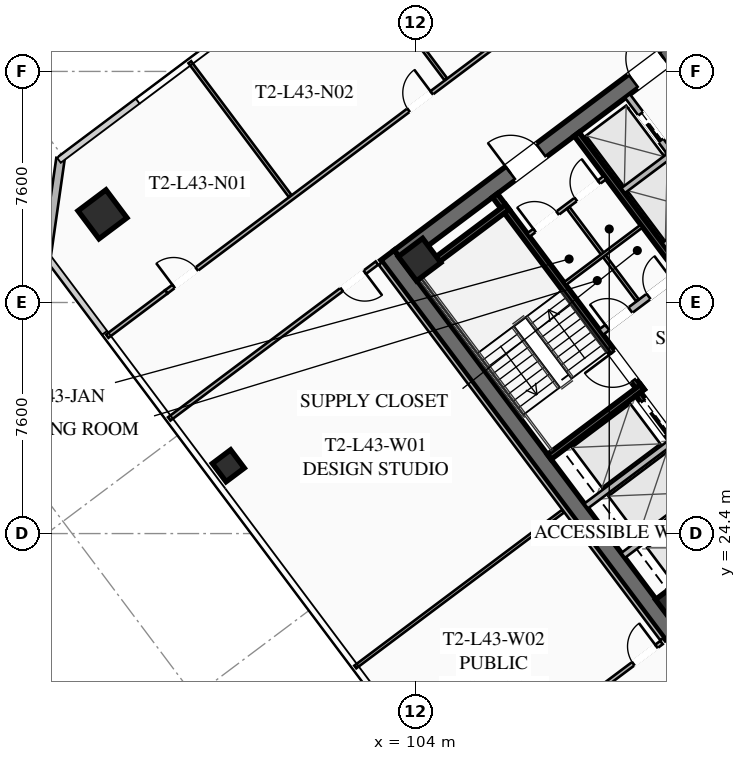
"""IFC4 building model, lengths in metres.
Left out: names, types, materials, properties, quantities, classifications, styles, units other than length and angle.
Written with IfcOpenShell. Run it as: python <this file> out.ifc"""

import sys

from ifc_helpers import new_model, si_unit, direction, frame, frame_2d, origin, origin_2d, place, context, subcontext, project, spatial, rectangle, hollow_rectangle, extrude, element, fill, save


model = new_model("IFC4")
c1 = context("Model", 3, precision=1e-05, world=origin(), true_north=direction((0.0, 1.0)))
c2 = subcontext(c1, "Body", "Model", "MODEL_VIEW")
j1 = project(units=[si_unit("LENGTHUNIT", "METRE"), si_unit("PLANEANGLEUNIT", "RADIAN")], contexts=[c1])
p1 = place(None, origin())
s1 = spatial("IfcSite", under=j1, at=p1, CompositionType="ELEMENT")
p2 = place(p1, origin())
s2 = spatial("IfcBuilding", under=s1, at=p2, CompositionType="ELEMENT")
p3 = place(p2, frame((0.0, 0.0, 160.55)))
s3 = spatial("IfcBuildingStorey", under=s2, at=p3, CompositionType="ELEMENT", Elevation=160.55)
p4 = place(p3, frame((112.436, 21.077, 0.0), z_axis=(0.0, 0.0, 1.0), x_axis=(-0.600005007985, 0.799996243986, 0.0)))
e1 = element("IfcWall", 1, at=p4, inside=s3, PredefinedType="SHEAR", context=c2, shape_type="SweptSolid", body=[
    extrude(rectangle(XDim=15.6, YDim=0.55, at=frame_2d((7.8, 0.0))), origin(), (0.0, 0.0, 1.0), 3.55),
])
p5 = place(p3, frame((103.461, 33.502, 0.0), z_axis=(0.0, 0.0, 1.0), x_axis=(0.799998054672, 0.600002593761, 0.0)))
e2 = element("IfcWall", 2, at=p5, inside=s3, PredefinedType="SHEAR", context=c2, shape_type="SweptSolid", body=[
    extrude(rectangle(XDim=15.06, YDim=0.55, at=frame_2d((7.53, 0.0))), origin(), (0.0, 0.0, 1.0), 3.55),
])
p6 = place(p5, frame((4.58, 0.0, 0.0)))
e3 = element("IfcOpeningElement", 3, at=p6, cuts=e2, PredefinedType="OPENING", context=c2, shape_type="SweptSolid", body=[
    extrude(rectangle(XDim=1.25, YDim=2.25, at=frame_2d((0.625, 1.125))), frame((0.0, 0.285, 0.0), z_axis=(0.0, -1.0, 0.0), x_axis=(1.0, 0.0, 0.0)), (0.0, 0.0, 1.0), 0.57),
])
p7 = place(p5, frame((9.63, 0.0, 0.0)))
e4 = element("IfcOpeningElement", 4, at=p7, cuts=e2, PredefinedType="OPENING", context=c2, shape_type="SweptSolid", body=[
    extrude(rectangle(XDim=1.25, YDim=2.25, at=frame_2d((0.625, 1.125))), frame((0.0, 0.285, 0.0), z_axis=(0.0, -1.0, 0.0), x_axis=(1.0, 0.0, 0.0)), (0.0, 0.0, 1.0), 0.57),
])
for number, where, z_axis, x_axis in (
    (5, (112.59, 22.13, 0.0), (0.0, 0.0, 1.0), (0.8, 0.6, 0.0)),
    (6, (104.13, 33.41, 0.0), (0.0, 0.0, 1.0), (0.8, 0.6, 0.0)),
):
    element("IfcColumn", number, at=place(p3, frame(where, z_axis=z_axis, x_axis=x_axis)), inside=s3, PredefinedType="COLUMN", context=c2, shape_type="SweptSolid", body=[
        extrude(hollow_rectangle(XDim=1.0, YDim=1.0, WallThickness=0.04, at=origin_2d()), origin(), (0.0, 0.0, 1.0), 3.37),
    ])
p8 = place(p3, frame((93.7, 34.9, 0.0), z_axis=(0.0, 0.0, 1.0), x_axis=(0.799999996291, 0.600000004945, 0.0)))
e7 = element("IfcColumn", 7, at=p8, inside=s3, PredefinedType="COLUMN", context=c2, shape_type="SweptSolid", body=[
    extrude(hollow_rectangle(XDim=1.15, YDim=1.15, WallThickness=0.045, at=origin_2d()), origin(), (0.0, 0.0, 1.0), 3.37),
])
p9 = place(p3, frame((97.84, 26.63, 0.0), z_axis=(0.0, 0.0, 1.0), x_axis=(0.799999996291, 0.600000004945, 0.0)))
e8 = element("IfcColumn", 8, at=p9, inside=s3, PredefinedType="COLUMN", context=c2, shape_type="SweptSolid", body=[
    extrude(hollow_rectangle(XDim=0.75, YDim=0.75, WallThickness=0.032, at=origin_2d()), origin(), (0.0, 0.0, 1.0), 3.37),
])
p10 = place(p3, frame((91.86, 33.52, 0.0), z_axis=(0.0, 0.0, 1.0), x_axis=(0.141410847992, 0.989950994782, 0.0)))
e9 = element("IfcWall", 9, at=p10, inside=s3, PredefinedType="SOLIDWALL", context=c2, shape_type="SweptSolid", body=[
    extrude(rectangle(XDim=3.253, YDim=0.28, at=frame_2d((1.626, 0.0))), origin(), (0.0, 0.0, 1.0), 3.37),
])
p11 = place(p3, frame((111.44, 29.08, 0.0), z_axis=(0.0, 0.0, 1.0), x_axis=(-0.59999029481, 0.8000072788, 0.0)))
e10 = element("IfcWall", 10, at=p11, inside=s3, PredefinedType="SHEAR", context=c2, shape_type="SweptSolid", body=[
    extrude(rectangle(XDim=8.05, YDim=0.2, at=frame_2d((4.025, 0.0))), origin(), (0.0, 0.0, 1.0), 3.37),
])
p12 = place(p11, frame((0.45, 0.0, 0.0)))
e11 = element("IfcOpeningElement", 11, at=p12, cuts=e10, PredefinedType="OPENING", context=c2, shape_type="SweptSolid", body=[
    extrude(rectangle(XDim=1.15, YDim=2.2, at=frame_2d((0.575, 1.1))), frame((0.0, 0.11, 0.0), z_axis=(0.0, -1.0, 0.0), x_axis=(1.0, 0.0, 0.0)), (0.0, 0.0, 1.0), 0.22),
])
for number, where, z_axis, x_axis in (
    (12, (108.396, 26.922, 0.0), (0.0, 0.0, 1.0), (0.8, 0.6, 0.0)),
    (13, (103.956, 32.842, 0.0), (0.0, 0.0, 1.0), (0.8, 0.6, 0.0)),
):
    element("IfcWall", number, at=place(p3, frame(where, z_axis=z_axis, x_axis=x_axis)), inside=s3, PredefinedType="SHEAR", context=c2, shape_type="SweptSolid", body=[
        extrude(rectangle(XDim=3.83, YDim=0.2, at=frame_2d((1.915, 0.0))), origin(), (0.0, 0.0, 1.0), 3.37),
    ])
p13 = place(p3, frame((117.998, 25.936, 0.0), z_axis=(0.0, 0.0, 1.0), x_axis=(-0.600002693989, 0.799997979501, 0.0)))
e14 = element("IfcWall", 14, at=p13, inside=s3, PredefinedType="SHEAR", context=c2, shape_type="SweptSolid", body=[
    extrude(rectangle(XDim=14.5, YDim=0.2, at=frame_2d((7.25, 0.0))), origin(), (0.0, 0.0, 1.0), 3.37),
])
p14 = place(p3, frame((110.104, 31.028, 0.0), z_axis=(0.0, 0.0, 1.0), x_axis=(0.800018601094, 0.59997519774, 0.0)))
e15 = element("IfcWall", 15, at=p14, inside=s3, PredefinedType="SOLIDWALL", context=c2, shape_type="SweptSolid", body=[
    extrude(rectangle(XDim=3.15, YDim=0.22, at=frame_2d((1.575, 0.0))), origin(), (0.0, 0.0, 1.0), 2.723),
])
p15 = place(p14, frame((0.25, 0.0, 0.0)))
e16 = element("IfcOpeningElement", 16, at=p15, cuts=e15, PredefinedType="OPENING", context=c2, shape_type="SweptSolid", body=[
    extrude(rectangle(XDim=0.95, YDim=2.05, at=frame_2d((0.475, 1.025))), frame((0.0, 0.12, 0.0), z_axis=(0.0, -1.0, 0.0), x_axis=(1.0, 0.0, 0.0)), (0.0, 0.0, 1.0), 0.24),
])
p16 = place(p14, frame((1.95, 0.0, 0.0)))
e17 = element("IfcOpeningElement", 17, at=p16, cuts=e15, PredefinedType="OPENING", context=c2, shape_type="SweptSolid", body=[
    extrude(rectangle(XDim=0.95, YDim=2.05, at=frame_2d((0.475, 1.025))), frame((0.0, 0.12, 0.0), z_axis=(0.0, -1.0, 0.0), x_axis=(1.0, 0.0, 0.0)), (0.0, 0.0, 1.0), 0.24),
])
p17 = place(p3, frame((115.19, 23.83, 0.0), z_axis=(0.0, 0.0, 1.0), x_axis=(-0.599993943644, 0.800004542231, 0.0)))
e18 = element("IfcWall", 18, at=p17, inside=s3, PredefinedType="SHEAR", context=c2, shape_type="SweptSolid", body=[
    extrude(rectangle(XDim=6.45, YDim=0.2, at=frame_2d((3.225, 0.0))), origin(), (0.0, 0.0, 1.0), 3.37),
])
p18 = place(p17, frame((4.875, 0.0, 0.0)))
e19 = element("IfcOpeningElement", 19, at=p18, cuts=e18, PredefinedType="OPENING", context=c2, shape_type="SweptSolid", body=[
    extrude(rectangle(XDim=1.3, YDim=2.25, at=frame_2d((0.65, 1.125))), frame((0.0, 0.11, 0.0), z_axis=(0.0, -1.0, 0.0), x_axis=(1.0, 0.0, 0.0)), (0.0, 0.0, 1.0), 0.22),
])
p19 = place(p17, frame((2.875, 0.0, 0.0)))
e20 = element("IfcOpeningElement", 20, at=p19, cuts=e18, PredefinedType="OPENING", context=c2, shape_type="SweptSolid", body=[
    extrude(rectangle(XDim=1.3, YDim=2.25, at=frame_2d((0.65, 1.125))), frame((0.0, 0.11, 0.0), z_axis=(0.0, -1.0, 0.0), x_axis=(1.0, 0.0, 0.0)), (0.0, 0.0, 1.0), 0.22),
])
p20 = place(p17, frame((0.675, 0.0, 0.0)))
e21 = element("IfcOpeningElement", 21, at=p20, cuts=e18, PredefinedType="OPENING", context=c2, shape_type="SweptSolid", body=[
    extrude(rectangle(XDim=1.3, YDim=2.25, at=frame_2d((0.65, 1.125))), frame((0.0, 0.11, 0.0), z_axis=(0.0, -1.0, 0.0), x_axis=(1.0, 0.0, 0.0)), (0.0, 0.0, 1.0), 0.22),
])
for number, where, z_axis, x_axis in (
    (22, (110.826, 23.682, 0.0), (0.0, 0.0, 1.0), (0.8, 0.6, 0.0)),
    (23, (109.608, 25.306, 0.0), (0.0, 0.0, 1.0), (0.8, 0.6, 0.0)),
):
    element("IfcWall", number, at=place(p3, frame(where, z_axis=z_axis, x_axis=x_axis)), inside=s3, PredefinedType="SOLIDWALL", context=c2, shape_type="SweptSolid", body=[
        extrude(rectangle(XDim=3.48, YDim=0.2, at=frame_2d((1.74, 0.0))), origin(), (0.0, 0.0, 1.0), 3.37),
    ])
p21 = place(p3, frame((107.71, 34.22, 0.0), z_axis=(0.0, 0.0, 1.0), x_axis=(0.799981399002, 0.60002480053, 0.0)))
e24 = element("IfcWall", 24, at=p21, inside=s3, PredefinedType="PARTITIONING", context=c2, shape_type="SweptSolid", body=[
    extrude(rectangle(XDim=3.15, YDim=0.135, at=frame_2d((1.575, 0.0))), origin(), (0.0, 0.0, 1.0), 2.723),
])
p22 = place(p21, frame((0.25, 0.0, 0.0)))
e25 = element("IfcOpeningElement", 25, at=p22, cuts=e24, PredefinedType="OPENING", context=c2, shape_type="SweptSolid", body=[
    extrude(rectangle(XDim=0.95, YDim=2.05, at=frame_2d((0.475, 1.025))), frame((0.0, 0.077, 0.0), z_axis=(0.0, -1.0, 0.0), x_axis=(1.0, 0.0, 0.0)), (0.0, 0.0, 1.0), 0.155),
])
p23 = place(p21, frame((1.95, 0.0, 0.0)))
e26 = element("IfcOpeningElement", 26, at=p23, cuts=e24, PredefinedType="OPENING", context=c2, shape_type="SweptSolid", body=[
    extrude(rectangle(XDim=0.95, YDim=2.05, at=frame_2d((0.475, 1.025))), frame((0.0, 0.077, 0.0), z_axis=(0.0, -1.0, 0.0), x_axis=(1.0, 0.0, 0.0)), (0.0, 0.0, 1.0), 0.155),
])
p24 = place(p3, frame((111.296, 32.072, 0.0), z_axis=(0.0, 0.0, 1.0), x_axis=(-0.59995887973, 0.800030838552, 0.0)))
e27 = element("IfcWall", 27, at=p24, inside=s3, PredefinedType="PARTITIONING", context=c2, shape_type="SweptSolid", body=[
    extrude(rectangle(XDim=3.8, YDim=0.11, at=frame_2d((1.9, 0.0))), origin(), (0.0, 0.0, 1.0), 2.723),
])
p25 = place(p3, frame((108.91, 32.62, 0.0), z_axis=(0.0, 0.0, 1.0), x_axis=(0.800018601094, 0.59997519774, 0.0)))
e28 = element("IfcWall", 28, at=p25, inside=s3, PredefinedType="PARTITIONING", context=c2, shape_type="SweptSolid", body=[
    extrude(rectangle(XDim=3.15, YDim=0.11, at=frame_2d((1.575, 0.0))), origin(), (0.0, 0.0, 1.0), 2.723),
])
p26 = place(p3, frame((115.11, 33.27, 0.0), z_axis=(0.0, 0.0, 1.0), x_axis=(-0.600011322243, 0.799991508192, 0.0)))
e29 = element("IfcWall", 29, at=p26, inside=s3, PredefinedType="SOLIDWALL", context=c2, shape_type="SweptSolid", body=[
    extrude(rectangle(XDim=6.9, YDim=0.2, at=frame_2d((3.45, 0.0))), origin(), (0.0, 0.0, 1.0), 3.37),
])
p27 = place(p26, frame((0.575, 0.0, 0.0)))
e30 = element("IfcOpeningElement", 30, at=p27, cuts=e29, PredefinedType="OPENING", context=c2, shape_type="SweptSolid", body=[
    extrude(rectangle(XDim=1.1, YDim=2.2, at=frame_2d((0.55, 1.1))), frame((0.0, 0.11, 0.0), z_axis=(0.0, -1.0, 0.0), x_axis=(1.0, 0.0, 0.0)), (0.0, 0.0, 1.0), 0.22),
])
p28 = place(p26, frame((2.825, 0.0, 0.0)))
e31 = element("IfcOpeningElement", 31, at=p28, cuts=e29, PredefinedType="OPENING", context=c2, shape_type="SweptSolid", body=[
    extrude(rectangle(XDim=1.1, YDim=2.2, at=frame_2d((0.55, 1.1))), frame((0.0, 0.11, 0.0), z_axis=(0.0, -1.0, 0.0), x_axis=(1.0, 0.0, 0.0)), (0.0, 0.0, 1.0), 0.22),
])
p29 = place(p26, frame((5.075, 0.0, 0.0)))
e32 = element("IfcOpeningElement", 32, at=p29, cuts=e29, PredefinedType="OPENING", context=c2, shape_type="SweptSolid", body=[
    extrude(rectangle(XDim=1.1, YDim=2.2, at=frame_2d((0.55, 1.1))), frame((0.0, 0.11, 0.0), z_axis=(0.0, -1.0, 0.0), x_axis=(1.0, 0.0, 0.0)), (0.0, 0.0, 1.0), 0.22),
])
p30 = place(p3, frame((112.176, 33.882, 0.0), z_axis=(0.0, 0.0, 1.0), x_axis=(0.8, 0.6, 0.0)))
e33 = element("IfcWall", 33, at=p30, inside=s3, PredefinedType="SOLIDWALL", context=c2, shape_type="SweptSolid", body=[
    extrude(rectangle(XDim=1.88, YDim=0.2, at=frame_2d((0.94, 0.0))), origin(), (0.0, 0.0, 1.0), 3.37),
])
p31 = place(p3, frame((110.826, 35.682, 0.0), z_axis=(0.0, 0.0, 1.0), x_axis=(0.799984418148, 0.600020775241, 0.0)))
e34 = element("IfcWall", 34, at=p31, inside=s3, PredefinedType="SOLIDWALL", context=c2, shape_type="SweptSolid", body=[
    extrude(rectangle(XDim=1.88, YDim=0.2, at=frame_2d((0.94, 0.0))), origin(), (0.0, 0.0, 1.0), 3.37),
])
p32 = place(p3, frame((95.8, 32.35, 0.0), z_axis=(0.0, 0.0, 1.0), x_axis=(0.8, 0.6, 0.0)))
e35 = element("IfcWall", 35, at=p32, inside=s3, PredefinedType="PARTITIONING", context=c2, shape_type="SweptSolid", body=[
    extrude(rectangle(XDim=28.7, YDim=0.135, at=frame_2d((14.35, 0.0))), origin(), (0.0, 0.0, 1.0), 2.723),
])
p33 = place(p32, frame((0.3, 0.0, 0.0)))
e36 = element("IfcOpeningElement", 36, at=p33, cuts=e35, PredefinedType="OPENING", context=c2, shape_type="SweptSolid", body=[
    extrude(rectangle(XDim=0.95, YDim=2.05, at=frame_2d((0.475, 1.025))), frame((0.0, 0.077, 0.0), z_axis=(0.0, -1.0, 0.0), x_axis=(1.0, 0.0, 0.0)), (0.0, 0.0, 1.0), 0.155),
])
p34 = place(p32, frame((9.959, 0.0, 0.0)))
e37 = element("IfcOpeningElement", 37, at=p34, cuts=e35, PredefinedType="OPENING", context=c2, shape_type="SweptSolid", body=[
    extrude(rectangle(XDim=0.95, YDim=2.05, at=frame_2d((0.475, 1.025))), frame((0.0, 0.077, 0.0), z_axis=(0.0, -1.0, 0.0), x_axis=(1.0, 0.0, 0.0)), (0.0, 0.0, 1.0), 0.155),
])
p35 = place(p32, frame((14.005, 0.0, 0.0)))
e38 = element("IfcOpeningElement", 38, at=p35, cuts=e35, PredefinedType="OPENING", context=c2, shape_type="SweptSolid", body=[
    extrude(rectangle(XDim=0.95, YDim=2.05, at=frame_2d((0.475, 1.025))), frame((0.0, 0.077, 0.0), z_axis=(0.0, -1.0, 0.0), x_axis=(1.0, 0.0, 0.0)), (0.0, 0.0, 1.0), 0.155),
])
p36 = place(p32, frame((18.049, 0.0, 0.0)))
e39 = element("IfcOpeningElement", 39, at=p36, cuts=e35, PredefinedType="OPENING", context=c2, shape_type="SweptSolid", body=[
    extrude(rectangle(XDim=0.95, YDim=2.05, at=frame_2d((0.475, 1.025))), frame((0.0, 0.077, 0.0), z_axis=(0.0, -1.0, 0.0), x_axis=(1.0, 0.0, 0.0)), (0.0, 0.0, 1.0), 0.155),
])
p37 = place(p32, frame((27.45, 0.0, 0.0)))
e40 = element("IfcOpeningElement", 40, at=p37, cuts=e35, PredefinedType="OPENING", context=c2, shape_type="SweptSolid", body=[
    extrude(rectangle(XDim=0.95, YDim=2.05, at=frame_2d((0.475, 1.025))), frame((0.0, 0.077, 0.0), z_axis=(0.0, -1.0, 0.0), x_axis=(1.0, 0.0, 0.0)), (0.0, 0.0, 1.0), 0.155),
])
p38 = place(p3, frame((93.856, 30.892, 0.0), z_axis=(0.0, 0.0, 1.0), x_axis=(0.800012055778, 0.599983925293, 0.0)))
e41 = element("IfcWall", 41, at=p38, inside=s3, PredefinedType="PARTITIONING", context=c2, shape_type="SweptSolid", body=[
    extrude(rectangle(XDim=2.43, YDim=0.135, at=frame_2d((1.215, 0.0))), origin(), (0.0, 0.0, 1.0), 2.723),
])
p39 = place(p3, frame((99.872, 35.504, 0.0), z_axis=(0.0, 0.0, 1.0), x_axis=(-0.599992897893, 0.800005326531, 0.0)))
e42 = element("IfcWall", 42, at=p39, inside=s3, PredefinedType="PARTITIONING", context=c2, shape_type="SweptSolid", body=[
    extrude(rectangle(XDim=5.5, YDim=0.11, at=frame_2d((2.75, 0.0))), origin(), (0.0, 0.0, 1.0), 2.723),
])
p40 = place(p3, frame((104.992, 39.344, 0.0), z_axis=(0.0, 0.0, 1.0), x_axis=(-0.600014204577, 0.79998934637, 0.0)))
e43 = element("IfcWall", 43, at=p40, inside=s3, PredefinedType="PARTITIONING", context=c2, shape_type="SweptSolid", body=[
    extrude(rectangle(XDim=5.5, YDim=0.11, at=frame_2d((2.75, 0.0))), origin(), (0.0, 0.0, 1.0), 2.723),
])
p41 = place(p3, frame((131.282, 32.874, 0.0), z_axis=(0.0, 0.0, 1.0), x_axis=(-0.8, -0.6, 0.0)))
e44 = element("IfcWall", 44, at=p41, inside=s3, PredefinedType="PARTITIONING", context=c2, shape_type="SweptSolid", body=[
    extrude(rectangle(XDim=28.7, YDim=0.135, at=frame_2d((14.35, 0.0))), origin(), (0.0, 0.0, 1.0), 2.723),
])
p42 = place(p41, frame((27.37, 0.0, 0.0)))
e45 = element("IfcOpeningElement", 45, at=p42, cuts=e44, PredefinedType="OPENING", context=c2, shape_type="SweptSolid", body=[
    extrude(rectangle(XDim=0.95, YDim=2.05, at=frame_2d((0.475, 1.025))), frame((0.0, 0.077, 0.0), z_axis=(0.0, -1.0, 0.0), x_axis=(1.0, 0.0, 0.0)), (0.0, 0.0, 1.0), 0.155),
])
p43 = place(p41, frame((13.592, 0.0, 0.0)))
e46 = element("IfcOpeningElement", 46, at=p43, cuts=e44, PredefinedType="OPENING", context=c2, shape_type="SweptSolid", body=[
    extrude(rectangle(XDim=0.95, YDim=2.05, at=frame_2d((0.475, 1.025))), frame((0.0, 0.077, 0.0), z_axis=(0.0, -1.0, 0.0), x_axis=(1.0, 0.0, 0.0)), (0.0, 0.0, 1.0), 0.155),
])
p44 = place(p41, frame((0.38, 0.0, 0.0)))
e47 = element("IfcOpeningElement", 47, at=p44, cuts=e44, PredefinedType="OPENING", context=c2, shape_type="SweptSolid", body=[
    extrude(rectangle(XDim=0.95, YDim=2.05, at=frame_2d((0.475, 1.025))), frame((0.0, 0.077, 0.0), z_axis=(0.0, -1.0, 0.0), x_axis=(1.0, 0.0, 0.0)), (0.0, 0.0, 1.0), 0.155),
])
p45 = place(p3, frame((112.104, 20.928, 0.0), z_axis=(0.0, 0.0, 1.0), x_axis=(-0.599994940075, 0.800003794918, 0.0)))
e48 = element("IfcWall", 48, at=p45, inside=s3, PredefinedType="PARTITIONING", context=c2, shape_type="SweptSolid", body=[
    extrude(rectangle(XDim=15.44, YDim=0.135, at=frame_2d((7.72, 0.0))), origin(), (0.0, 0.0, 1.0), 2.723),
])
p46 = place(p3, frame((102.728, 33.296, 0.0), z_axis=(0.0, 0.0, 1.0), x_axis=(-0.800013722153, -0.59998170336, 0.0)))
e49 = element("IfcWall", 49, at=p46, inside=s3, PredefinedType="PARTITIONING", context=c2, shape_type="SweptSolid", body=[
    extrude(rectangle(XDim=8.54, YDim=0.135, at=frame_2d((4.27, 0.0))), origin(), (0.0, 0.0, 1.0), 2.723),
])
p47 = place(p46, frame((0.5, 0.0, 0.0)))
e50 = element("IfcOpeningElement", 50, at=p47, cuts=e49, PredefinedType="OPENING", context=c2, shape_type="SweptSolid", body=[
    extrude(rectangle(XDim=0.95, YDim=2.05, at=frame_2d((0.475, 1.025))), frame((0.0, 0.077, 0.0), z_axis=(0.0, -1.0, 0.0), x_axis=(1.0, 0.0, 0.0)), (0.0, 0.0, 1.0), 0.155),
])
p48 = place(p3, frame((105.256, 15.692, 0.0), z_axis=(0.0, 0.0, 1.0), x_axis=(0.799989708052, 0.600013722352, 0.0)))
e51 = element("IfcWall", 51, at=p48, inside=s3, PredefinedType="PARTITIONING", context=c2, shape_type="SweptSolid", body=[
    extrude(rectangle(XDim=8.54, YDim=0.135, at=frame_2d((4.27, 0.0))), origin(), (0.0, 0.0, 1.0), 2.723),
])
p49 = place(p48, frame((7.38, 0.0, 0.0)))
e52 = element("IfcOpeningElement", 52, at=p49, cuts=e51, PredefinedType="OPENING", context=c2, shape_type="SweptSolid", body=[
    extrude(rectangle(XDim=0.95, YDim=2.05, at=frame_2d((0.475, 1.025))), frame((0.0, 0.077, 0.0), z_axis=(0.0, -1.0, 0.0), x_axis=(1.0, 0.0, 0.0)), (0.0, 0.0, 1.0), 0.155),
])
p50 = place(p3, frame((102.016, 20.012, 0.0), z_axis=(0.0, 0.0, 1.0), x_axis=(0.799989708052, 0.600013722352, 0.0)))
e53 = element("IfcWall", 53, at=p50, inside=s3, PredefinedType="PARTITIONING", context=c2, shape_type="SweptSolid", body=[
    extrude(rectangle(XDim=8.54, YDim=0.11, at=frame_2d((4.27, 0.0))), origin(), (0.0, 0.0, 1.0), 2.723),
])
p51 = place(p6, origin())
e54 = element("IfcDoor", 54, at=p51, inside=s3, OperationType="SINGLE_SWING_LEFT", PredefinedType="DOOR", context=c2, shape_type="SweptSolid", body=[
    extrude(rectangle(XDim=1.25, YDim=2.25, at=frame_2d((0.625, 1.125))), frame((0.0, 0.025, 0.0), z_axis=(0.0, -1.0, 0.0), x_axis=(1.0, 0.0, 0.0)), (0.0, 0.0, 1.0), 0.05),
])
fill(e3, e54)
p52 = place(p7, origin())
e55 = element("IfcDoor", 55, at=p52, inside=s3, OperationType="SINGLE_SWING_RIGHT", PredefinedType="DOOR", context=c2, shape_type="SweptSolid", body=[
    extrude(rectangle(XDim=1.25, YDim=2.25, at=frame_2d((0.625, 1.125))), frame((0.0, 0.025, 0.0), z_axis=(0.0, -1.0, 0.0), x_axis=(1.0, 0.0, 0.0)), (0.0, 0.0, 1.0), 0.05),
])
fill(e4, e55)
p53 = place(p12, origin())
e56 = element("IfcDoor", 56, at=p53, inside=s3, OperationType="SINGLE_SWING_RIGHT", PredefinedType="DOOR", context=c2, shape_type="SweptSolid", body=[
    extrude(rectangle(XDim=1.15, YDim=2.2, at=frame_2d((0.575, 1.1))), frame((0.0, 0.025, 0.0), z_axis=(0.0, -1.0, 0.0), x_axis=(1.0, 0.0, 0.0)), (0.0, 0.0, 1.0), 0.05),
])
fill(e11, e56)
p54 = place(p22, origin())
e57 = element("IfcDoor", 57, at=p54, inside=s3, OperationType="SINGLE_SWING_LEFT", PredefinedType="DOOR", context=c2, shape_type="SweptSolid", body=[
    extrude(rectangle(XDim=0.95, YDim=2.05, at=frame_2d((0.475, 1.025))), frame((0.0, 0.025, 0.0), z_axis=(0.0, -1.0, 0.0), x_axis=(1.0, 0.0, 0.0)), (0.0, 0.0, 1.0), 0.05),
])
fill(e25, e57)
p55 = place(p23, origin())
e58 = element("IfcDoor", 58, at=p55, inside=s3, OperationType="SINGLE_SWING_RIGHT", PredefinedType="DOOR", context=c2, shape_type="SweptSolid", body=[
    extrude(rectangle(XDim=0.95, YDim=2.05, at=frame_2d((0.475, 1.025))), frame((0.0, 0.025, 0.0), z_axis=(0.0, -1.0, 0.0), x_axis=(1.0, 0.0, 0.0)), (0.0, 0.0, 1.0), 0.05),
])
fill(e26, e58)
p56 = place(p15, origin())
e59 = element("IfcDoor", 59, at=p56, inside=s3, OperationType="SINGLE_SWING_LEFT", PredefinedType="DOOR", context=c2, shape_type="SweptSolid", body=[
    extrude(rectangle(XDim=0.95, YDim=2.05, at=frame_2d((0.475, 1.025))), frame((0.0, 0.025, 0.0), z_axis=(0.0, -1.0, 0.0), x_axis=(1.0, 0.0, 0.0)), (0.0, 0.0, 1.0), 0.05),
])
fill(e16, e59)
p57 = place(p16, origin())
e60 = element("IfcDoor", 60, at=p57, inside=s3, OperationType="SINGLE_SWING_RIGHT", PredefinedType="DOOR", context=c2, shape_type="SweptSolid", body=[
    extrude(rectangle(XDim=0.95, YDim=2.05, at=frame_2d((0.475, 1.025))), frame((0.0, 0.025, 0.0), z_axis=(0.0, -1.0, 0.0), x_axis=(1.0, 0.0, 0.0)), (0.0, 0.0, 1.0), 0.05),
])
fill(e17, e60)
p58 = place(p33, origin())
e61 = element("IfcDoor", 61, at=p58, inside=s3, OperationType="SINGLE_SWING_LEFT", PredefinedType="DOOR", context=c2, shape_type="SweptSolid", body=[
    extrude(rectangle(XDim=0.95, YDim=2.05, at=frame_2d((0.475, 1.025))), frame((0.0, 0.025, 0.0), z_axis=(0.0, -1.0, 0.0), x_axis=(1.0, 0.0, 0.0)), (0.0, 0.0, 1.0), 0.05),
])
fill(e36, e61)
p59 = place(p34, origin())
e62 = element("IfcDoor", 62, at=p59, inside=s3, OperationType="SINGLE_SWING_RIGHT", PredefinedType="DOOR", context=c2, shape_type="SweptSolid", body=[
    extrude(rectangle(XDim=0.95, YDim=2.05, at=frame_2d((0.475, 1.025))), frame((0.0, 0.025, 0.0), z_axis=(0.0, -1.0, 0.0), x_axis=(1.0, 0.0, 0.0)), (0.0, 0.0, 1.0), 0.05),
])
fill(e37, e62)
p60 = place(p47, origin())
e63 = element("IfcDoor", 63, at=p60, inside=s3, OperationType="SINGLE_SWING_LEFT", PredefinedType="DOOR", context=c2, shape_type="SweptSolid", body=[
    extrude(rectangle(XDim=0.95, YDim=2.05, at=frame_2d((0.475, 1.025))), frame((0.0, 0.025, 0.0), z_axis=(0.0, -1.0, 0.0), x_axis=(1.0, 0.0, 0.0)), (0.0, 0.0, 1.0), 0.05),
])
fill(e50, e63)
p61 = place(p49, origin())
e64 = element("IfcDoor", 64, at=p61, inside=s3, OperationType="SINGLE_SWING_RIGHT", PredefinedType="DOOR", context=c2, shape_type="SweptSolid", body=[
    extrude(rectangle(XDim=0.95, YDim=2.05, at=frame_2d((0.475, 1.025))), frame((0.0, 0.025, 0.0), z_axis=(0.0, -1.0, 0.0), x_axis=(1.0, 0.0, 0.0)), (0.0, 0.0, 1.0), 0.05),
])
fill(e52, e64)
p62 = place(p18, origin())
e65 = element("IfcDoor", 65, at=p62, inside=s3, OperationType="SLIDING_TO_LEFT", PredefinedType="DOOR", context=c2, shape_type="SweptSolid", body=[
    extrude(rectangle(XDim=1.3, YDim=2.25, at=frame_2d((0.65, 1.125))), frame((0.0, 0.025, 0.0), z_axis=(0.0, -1.0, 0.0), x_axis=(1.0, 0.0, 0.0)), (0.0, 0.0, 1.0), 0.05),
])
fill(e19, e65)
p63 = place(p29, origin())
e66 = element("IfcDoor", 66, at=p63, inside=s3, OperationType="SLIDING_TO_LEFT", PredefinedType="DOOR", context=c2, shape_type="SweptSolid", body=[
    extrude(rectangle(XDim=1.1, YDim=2.2, at=frame_2d((0.55, 1.1))), frame((0.0, 0.025, 0.0), z_axis=(0.0, -1.0, 0.0), x_axis=(1.0, 0.0, 0.0)), (0.0, 0.0, 1.0), 0.05),
])
fill(e32, e66)
save(model, sys.argv[1])
